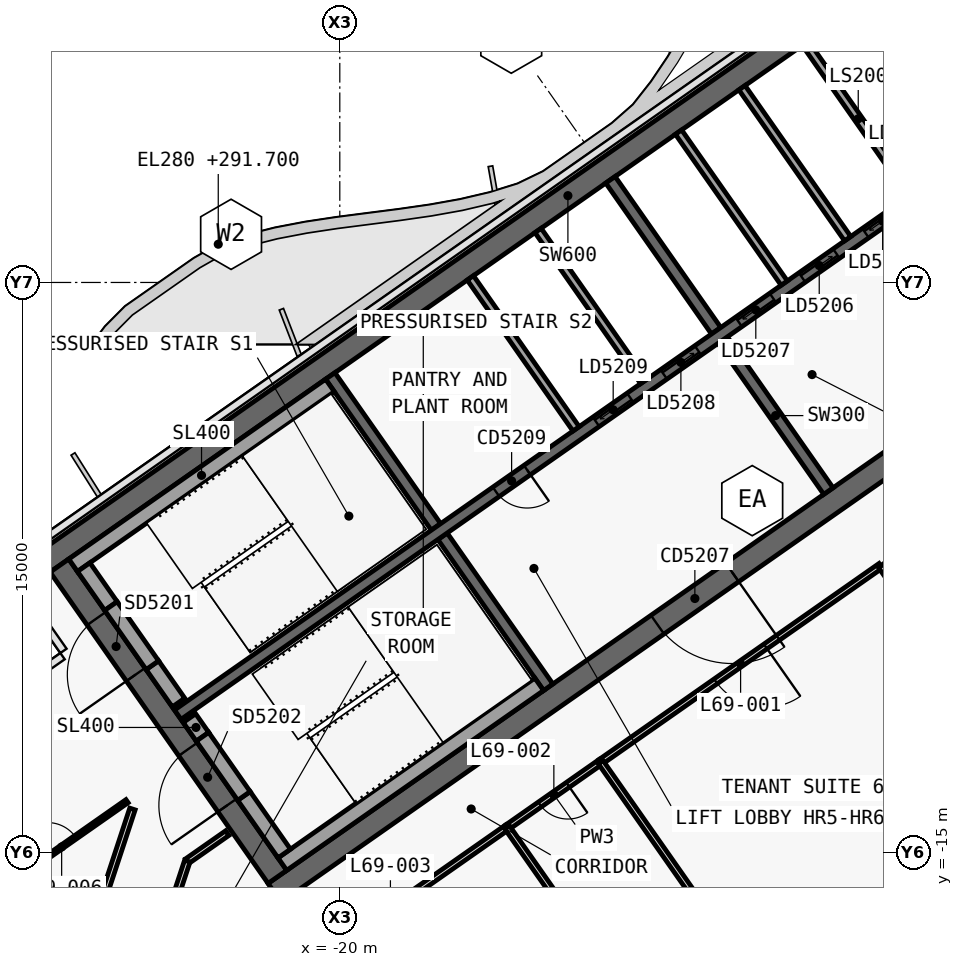
"""IFC4 building model, lengths in metres.
Left out: names, types, materials, properties, quantities, classifications, styles, units other than length and angle.
Written with IfcOpenShell. Run it as: python <this file> out.ifc"""

import sys

from ifc_helpers import new_model, si_unit, direction, frame, frame_2d, origin, place, context, subcontext, project, spatial, polyline, rectangle, outline, extrude, element, fill, save


model = new_model("IFC4")
c1 = context("Model", 3, precision=1e-05, world=origin(), true_north=direction((0.0, 1.0)))
c2 = subcontext(c1, "Body", "Model", "MODEL_VIEW")
j1 = project(units=[si_unit("LENGTHUNIT", "METRE"), si_unit("PLANEANGLEUNIT", "RADIAN")], contexts=[c1])
p1 = place(None, origin())
s1 = spatial("IfcSite", under=j1, at=p1, CompositionType="ELEMENT")
p2 = place(p1, origin())
s2 = spatial("IfcBuilding", under=s1, at=p2, CompositionType="ELEMENT")
p3 = place(p2, frame((0.0, 0.0, 291.7)))
s3 = spatial("IfcBuildingStorey", under=s2, at=p3, CompositionType="ELEMENT", Elevation=291.7)
p4 = place(p3, frame((-0.028, 12.066, 0.0), z_axis=(0.0, 0.0, 1.0), x_axis=(-0.819151382952, -0.573577380837, 0.0)))
e1 = element("IfcWall", 1, at=p4, inside=s3, PredefinedType="SHEAR", context=c2, shape_type="SweptSolid", body=[
    extrude(outline(polyline([(33.898, 0.3), (0.42, 0.3), (0.0, -0.3), (33.898, -0.3), (33.898, 0.3)])), origin(), (0.0, 0.0, 1.0), 3.9),
])
p5 = place(p3, frame((-0.028, -0.874, 0.0), z_axis=(0.0, 0.0, 1.0), x_axis=(-0.819150035022, -0.573579305871, 0.0)))
e2 = element("IfcWall", 2, at=p5, inside=s3, PredefinedType="SHEAR", context=c2, shape_type="SweptSolid", body=[
    extrude(outline(polyline([(26.476, 0.3), (0.42, 0.3), (0.0, -0.3), (26.476, -0.3), (26.476, 0.3)])), origin(), (0.0, 0.0, 1.0), 3.9),
])
p6 = place(p5, frame((2.976, 0.0, 0.0)))
e3 = element("IfcOpeningElement", 3, at=p6, cuts=e2, PredefinedType="OPENING", context=c2, shape_type="SweptSolid", body=[
    extrude(rectangle(XDim=2.4, YDim=2.1, at=frame_2d((1.2, 1.05))), frame((0.0, 0.31, 0.0), z_axis=(0.0, -1.0, 0.0), x_axis=(1.0, 0.0, 0.0)), (0.0, 0.0, 1.0), 0.62),
])
p7 = place(p5, frame((11.776, 0.0, 0.0)))
e4 = element("IfcOpeningElement", 4, at=p7, cuts=e2, PredefinedType="OPENING", context=c2, shape_type="SweptSolid", body=[
    extrude(rectangle(XDim=2.4, YDim=2.1, at=frame_2d((1.2, 1.05))), frame((0.0, 0.31, 0.0), z_axis=(0.0, -1.0, 0.0), x_axis=(1.0, 0.0, 0.0)), (0.0, 0.0, 1.0), 0.62),
])
p8 = place(p3, frame((-21.642, -15.642, 0.0), z_axis=(0.0, 0.0, 1.0), x_axis=(-0.573586866468, 0.819144740944, 0.0)))
e5 = element("IfcWall", 5, at=p8, inside=s3, PredefinedType="SHEAR", context=c2, shape_type="SweptSolid", body=[
    extrude(outline(polyline([(0.0, 0.3), (0.0, -0.3), (10.0, -0.3), (10.0, 0.3), (0.0, 0.3)])), origin(), (0.0, 0.0, 1.0), 3.9),
])
p9 = place(p8, frame((6.5, 0.0, 0.0)))
e6 = element("IfcOpeningElement", 6, at=p9, cuts=e5, PredefinedType="OPENING", context=c2, shape_type="SweptSolid", body=[
    extrude(rectangle(XDim=1.8, YDim=2.1, at=frame_2d((0.9, 1.05))), frame((0.0, 0.31, 0.0), z_axis=(0.0, -1.0, 0.0), x_axis=(1.0, 0.0, 0.0)), (0.0, 0.0, 1.0), 0.62),
])
p10 = place(p8, frame((2.3, 0.0, 0.0)))
e7 = element("IfcOpeningElement", 7, at=p10, cuts=e5, PredefinedType="OPENING", context=c2, shape_type="SweptSolid", body=[
    extrude(rectangle(XDim=1.8, YDim=2.1, at=frame_2d((0.9, 1.05))), frame((0.0, 0.31, 0.0), z_axis=(0.0, -1.0, 0.0), x_axis=(1.0, 0.0, 0.0)), (0.0, 0.0, 1.0), 0.62),
])
p11 = place(p3, frame((-7.143, -5.49, 0.0), z_axis=(0.0, 0.0, 1.0), x_axis=(-0.573617744349, 0.819123118565, 0.0)))
e8 = element("IfcWall", 8, at=p11, inside=s3, PredefinedType="SHEAR", context=c2, shape_type="SweptSolid", body=[
    extrude(outline(polyline([(4.85, 0.15), (0.0, 0.15), (0.0, -0.15), (4.85, -0.15), (4.85, 0.15)])), origin(), (0.0, 0.0, 1.0), 3.9),
])
p12 = place(p3, frame((-10.097, -1.271, 0.0), z_axis=(0.0, 0.0, 1.0), x_axis=(-0.573560315113, 0.819163332265, 0.0)))
e9 = element("IfcWall", 9, at=p12, inside=s3, PredefinedType="SHEAR", context=c2, shape_type="SweptSolid", body=[
    extrude(outline(polyline([(4.85, -0.15), (4.85, 0.15), (0.0, 0.15), (0.0, -0.15), (4.85, -0.15)])), origin(), (0.0, 0.0, 1.0), 3.9),
])
p13 = place(p3, frame((-14.515, -10.652, 0.0), z_axis=(0.0, 0.0, 1.0), x_axis=(-0.573560315113, 0.819163332265, 0.0)))
e10 = element("IfcWall", 10, at=p13, inside=s3, PredefinedType="SHEAR", context=c2, shape_type="SweptSolid", body=[
    extrude(outline(polyline([(4.85, 0.15), (0.0, 0.15), (0.0, -0.15), (4.85, -0.15), (4.85, 0.15)])), origin(), (0.0, 0.0, 1.0), 3.9),
])
p14 = place(p3, frame((-17.469, -6.433, 0.0), z_axis=(0.0, 0.0, 1.0), x_axis=(-0.573594092424, 0.81913968109, 0.0)))
e11 = element("IfcWall", 11, at=p14, inside=s3, PredefinedType="SHEAR", context=c2, shape_type="SweptSolid", body=[
    extrude(outline(polyline([(4.85, -0.15), (4.85, 0.15), (0.0, 0.15), (0.0, -0.15), (4.85, -0.15)])), origin(), (0.0, 0.0, 1.0), 3.9),
])
p15 = place(p3, frame((-2.638, 3.768, 0.0), z_axis=(0.0, 0.0, 1.0), x_axis=(-0.819155014212, -0.573572194837, 0.0)))
e12 = element("IfcWall", 12, at=p15, inside=s3, PredefinedType="SHEAR", context=c2, shape_type="SweptSolid", body=[
    extrude(outline(polyline([(26.4, 0.15), (0.0, 0.15), (0.0, -0.15), (26.4, -0.15), (26.4, 0.15)])), origin(), (0.0, 0.0, 1.0), 3.9),
])
p16 = place(p15, frame((1.169, 0.0, 0.0)))
e13 = element("IfcOpeningElement", 13, at=p16, cuts=e12, PredefinedType="OPENING", context=c2, shape_type="SweptSolid", body=[
    extrude(rectangle(XDim=1.1, YDim=2.1, at=frame_2d((0.55, 1.05))), frame((0.0, 0.16, 0.0), z_axis=(0.0, -1.0, 0.0), x_axis=(1.0, 0.0, 0.0)), (0.0, 0.0, 1.0), 0.32),
])
p17 = place(p15, frame((3.206, 0.0, 0.0)))
e14 = element("IfcOpeningElement", 14, at=p17, cuts=e12, PredefinedType="OPENING", context=c2, shape_type="SweptSolid", body=[
    extrude(rectangle(XDim=1.1, YDim=2.1, at=frame_2d((0.55, 1.05))), frame((0.0, 0.16, 0.0), z_axis=(0.0, -1.0, 0.0), x_axis=(1.0, 0.0, 0.0)), (0.0, 0.0, 1.0), 0.32),
])
p18 = place(p15, frame((5.244, 0.0, 0.0)))
e15 = element("IfcOpeningElement", 15, at=p18, cuts=e12, PredefinedType="OPENING", context=c2, shape_type="SweptSolid", body=[
    extrude(rectangle(XDim=1.1, YDim=2.1, at=frame_2d((0.55, 1.05))), frame((0.0, 0.16, 0.0), z_axis=(0.0, -1.0, 0.0), x_axis=(1.0, 0.0, 0.0)), (0.0, 0.0, 1.0), 0.32),
])
p19 = place(p15, frame((7.281, 0.0, 0.0)))
e16 = element("IfcOpeningElement", 16, at=p19, cuts=e12, PredefinedType="OPENING", context=c2, shape_type="SweptSolid", body=[
    extrude(rectangle(XDim=1.1, YDim=2.1, at=frame_2d((0.55, 1.05))), frame((0.0, 0.16, 0.0), z_axis=(0.0, -1.0, 0.0), x_axis=(1.0, 0.0, 0.0)), (0.0, 0.0, 1.0), 0.32),
])
p20 = place(p15, frame((9.688, 0.0, 0.0)))
e17 = element("IfcOpeningElement", 17, at=p20, cuts=e12, PredefinedType="OPENING", context=c2, shape_type="SweptSolid", body=[
    extrude(rectangle(XDim=1.1, YDim=2.1, at=frame_2d((0.55, 1.05))), frame((0.0, 0.16, 0.0), z_axis=(0.0, -1.0, 0.0), x_axis=(1.0, 0.0, 0.0)), (0.0, 0.0, 1.0), 0.32),
])
p21 = place(p15, frame((11.863, 0.0, 0.0)))
e18 = element("IfcOpeningElement", 18, at=p21, cuts=e12, PredefinedType="OPENING", context=c2, shape_type="SweptSolid", body=[
    extrude(rectangle(XDim=1.1, YDim=2.1, at=frame_2d((0.55, 1.05))), frame((0.0, 0.16, 0.0), z_axis=(0.0, -1.0, 0.0), x_axis=(1.0, 0.0, 0.0)), (0.0, 0.0, 1.0), 0.32),
])
p22 = place(p15, frame((15.175, 0.0, 0.0)))
e19 = element("IfcOpeningElement", 19, at=p22, cuts=e12, PredefinedType="OPENING", context=c2, shape_type="SweptSolid", body=[
    extrude(rectangle(XDim=1.0, YDim=2.1, at=frame_2d((0.5, 1.05))), frame((0.0, 0.16, 0.0), z_axis=(0.0, -1.0, 0.0), x_axis=(1.0, 0.0, 0.0)), (0.0, 0.0, 1.0), 0.32),
])
p23 = place(p3, frame((-4.967, 2.321, 0.0), z_axis=(0.0, 0.0, 1.0), x_axis=(-0.573594092424, 0.81913968109, 0.0)))
e20 = element("IfcWall", 20, at=p23, inside=s3, PredefinedType="SOLIDWALL", context=c2, shape_type="SweptSolid", body=[
    extrude(rectangle(XDim=4.85, YDim=0.2, at=frame_2d((2.425, 0.0))), origin(), (0.0, 0.0, 1.0), 3.9),
])
p24 = place(p3, frame((-6.636, 1.152, 0.0), z_axis=(0.0, 0.0, 1.0), x_axis=(-0.573560315113, 0.819163332265, 0.0)))
e21 = element("IfcWall", 21, at=p24, inside=s3, PredefinedType="SOLIDWALL", context=c2, shape_type="SweptSolid", body=[
    extrude(rectangle(XDim=4.85, YDim=0.2, at=frame_2d((2.425, 0.0))), origin(), (0.0, 0.0, 1.0), 3.9),
])
p25 = place(p3, frame((-8.305, -0.017, 0.0), z_axis=(0.0, 0.0, 1.0), x_axis=(-0.573594092424, 0.81913968109, 0.0)))
e22 = element("IfcWall", 22, at=p25, inside=s3, PredefinedType="SOLIDWALL", context=c2, shape_type="SweptSolid", body=[
    extrude(rectangle(XDim=4.85, YDim=0.2, at=frame_2d((2.425, 0.0))), origin(), (0.0, 0.0, 1.0), 3.9),
])
p26 = place(p3, frame((-12.001, -2.605, 0.0), z_axis=(0.0, 0.0, 1.0), x_axis=(-0.573560315113, 0.819163332265, 0.0)))
e23 = element("IfcWall", 23, at=p26, inside=s3, PredefinedType="SOLIDWALL", context=c2, shape_type="SweptSolid", body=[
    extrude(rectangle(XDim=4.85, YDim=0.2, at=frame_2d((2.425, 0.0))), origin(), (0.0, 0.0, 1.0), 3.9),
])
p27 = place(p3, frame((-13.783, -3.852, 0.0), z_axis=(0.0, 0.0, 1.0), x_axis=(-0.573594092424, 0.81913968109, 0.0)))
e24 = element("IfcWall", 24, at=p27, inside=s3, PredefinedType="SOLIDWALL", context=c2, shape_type="SweptSolid", body=[
    extrude(rectangle(XDim=4.85, YDim=0.2, at=frame_2d((2.425, 0.0))), origin(), (0.0, 0.0, 1.0), 3.9),
])
p28 = place(p3, frame((-20.259, -2.71, 0.0), z_axis=(0.0, 0.0, 1.0), x_axis=(-0.81914849389, -0.573581506813, 0.0)))
e25 = element("IfcWall", 25, at=p28, inside=s3, PredefinedType="SOLIDWALL", context=c2, shape_type="SweptSolid", body=[
    extrude(rectangle(XDim=8.25, YDim=0.4, at=frame_2d((4.125, 0.0))), origin(), (0.0, 0.0, 1.0), 3.62),
])
p29 = place(p3, frame((-24.244, -11.055, 0.0), z_axis=(0.0, 0.0, 1.0), x_axis=(-0.573571582932, 0.819155442668, 0.0)))
e26 = element("IfcWall", 26, at=p29, inside=s3, PredefinedType="SOLIDWALL", context=c2, shape_type="SweptSolid", body=[
    extrude(rectangle(XDim=1.2, YDim=0.4, at=frame_2d((0.6, 0.0))), origin(), (0.0, 0.0, 1.0), 3.62),
])
p30 = place(p3, frame((-26.022, -8.515, 0.0), z_axis=(0.0, 0.0, 1.0), x_axis=(-0.573619628835, 0.819121798889, 0.0)))
e27 = element("IfcWall", 27, at=p30, inside=s3, PredefinedType="SOLIDWALL", context=c2, shape_type="SweptSolid", body=[
    extrude(rectangle(XDim=1.25, YDim=0.4, at=frame_2d((0.625, 0.0))), origin(), (0.0, 0.0, 1.0), 3.62),
])
p31 = place(p3, frame((-24.932, -10.072, 2.15), z_axis=(0.0, 0.0, 1.0), x_axis=(-0.573591692345, 0.819141361715, 0.0)))
e28 = element("IfcWall", 28, at=p31, inside=s3, PredefinedType="SOLIDWALL", context=c2, shape_type="SweptSolid", body=[
    extrude(rectangle(XDim=1.9, YDim=0.4, at=frame_2d((0.95, 0.0))), origin(), (0.0, 0.0, 1.0), 1.47),
])
p32 = place(p3, frame((-14.753, -10.574, 0.0), z_axis=(0.0, 0.0, 1.0), x_axis=(-0.819158229677, -0.573567602601, 0.0)))
e29 = element("IfcWall", 29, at=p32, inside=s3, PredefinedType="SOLIDWALL", context=c2, shape_type="SweptSolid", body=[
    extrude(rectangle(XDim=8.25, YDim=0.4, at=frame_2d((4.125, 0.0))), origin(), (0.0, 0.0, 1.0), 3.62),
])
p33 = place(p3, frame((-21.462, -15.028, 0.0), z_axis=(0.0, 0.0, 1.0), x_axis=(-0.573559770908, 0.819163713305, 0.0)))
e30 = element("IfcWall", 30, at=p33, inside=s3, PredefinedType="SOLIDWALL", context=c2, shape_type="SweptSolid", body=[
    extrude(rectangle(XDim=1.85, YDim=0.4, at=frame_2d((0.925, 0.0))), origin(), (0.0, 0.0, 1.0), 3.62),
])
p34 = place(p3, frame((-23.613, -11.956, 0.0), z_axis=(0.0, 0.0, 1.0), x_axis=(-0.573435029941, 0.819251039936, 0.0)))
e31 = element("IfcWall", 31, at=p34, inside=s3, PredefinedType="SOLIDWALL", context=c2, shape_type="SweptSolid", body=[
    extrude(rectangle(XDim=0.6, YDim=0.4, at=frame_2d((0.3, 0.0))), origin(), (0.0, 0.0, 1.0), 3.62),
])
p35 = place(p3, frame((-22.523, -13.512, 2.15), z_axis=(0.0, 0.0, 1.0), x_axis=(-0.573591692345, 0.819141361715, 0.0)))
e32 = element("IfcWall", 32, at=p35, inside=s3, PredefinedType="SOLIDWALL", context=c2, shape_type="SweptSolid", body=[
    extrude(rectangle(XDim=1.9, YDim=0.4, at=frame_2d((0.95, 0.0))), origin(), (0.0, 0.0, 1.0), 1.47),
])
p36 = place(p3, frame((-3.298, 3.49, 0.0), z_axis=(0.0, 0.0, 1.0), x_axis=(-0.573560315113, 0.819163332265, 0.0)))
e33 = element("IfcWall", 33, at=p36, inside=s3, PredefinedType="SOLIDWALL", context=c2, shape_type="SweptSolid", body=[
    extrude(rectangle(XDim=4.85, YDim=0.2, at=frame_2d((2.425, 0.0))), origin(), (0.0, 0.0, 1.0), 3.62),
])
p37 = place(p3, frame((-5.766, -7.456, 0.0), z_axis=(0.0, 0.0, 1.0), x_axis=(-0.81915291695, -0.57357519006, 0.0)))
e34 = element("IfcWall", 34, at=p37, inside=s3, PredefinedType="PARTITIONING", context=c2, shape_type="SweptSolid", body=[
    extrude(rectangle(XDim=9.002, YDim=0.15, at=frame_2d((4.501, 0.0))), origin(), (0.0, 0.0, 1.0), 3.05),
])
p38 = place(p37, frame((3.701, 0.0, 0.0)))
e35 = element("IfcOpeningElement", 35, at=p38, cuts=e34, PredefinedType="OPENING", context=c2, shape_type="SweptSolid", body=[
    extrude(rectangle(XDim=1.6, YDim=2.1, at=frame_2d((0.8, 1.05))), frame((0.0, 0.085, 0.0), z_axis=(0.0, -1.0, 0.0), x_axis=(1.0, 0.0, 0.0)), (0.0, 0.0, 1.0), 0.17),
])
p39 = place(p3, frame((-13.137, -12.617, 0.0), z_axis=(0.0, 0.0, 1.0), x_axis=(-0.81916700466, -0.573555070134, 0.0)))
e36 = element("IfcWall", 36, at=p39, inside=s3, PredefinedType="PARTITIONING", context=c2, shape_type="SweptSolid", body=[
    extrude(rectangle(XDim=3.004, YDim=0.15, at=frame_2d((1.502, 0.0))), origin(), (0.0, 0.0, 1.0), 3.05),
])
p40 = place(p39, frame((1.052, 0.0, 0.0)))
e37 = element("IfcOpeningElement", 37, at=p40, cuts=e36, PredefinedType="OPENING", context=c2, shape_type="SweptSolid", body=[
    extrude(rectangle(XDim=0.9, YDim=2.1, at=frame_2d((0.45, 1.05))), frame((0.0, 0.085, 0.0), z_axis=(0.0, -1.0, 0.0), x_axis=(1.0, 0.0, 0.0)), (0.0, 0.0, 1.0), 0.17),
])
p41 = place(p3, frame((-15.594, -14.338, 0.0), z_axis=(0.0, 0.0, 1.0), x_axis=(-0.819164661457, -0.573558416746, 0.0)))
e38 = element("IfcWall", 38, at=p41, inside=s3, PredefinedType="PARTITIONING", context=c2, shape_type="SweptSolid", body=[
    extrude(rectangle(XDim=7.504, YDim=0.15, at=frame_2d((3.752, 0.0))), origin(), (0.0, 0.0, 1.0), 3.05),
])
p42 = place(p41, frame((2.952, 0.0, 0.0)))
e39 = element("IfcOpeningElement", 39, at=p42, cuts=e38, PredefinedType="OPENING", context=c2, shape_type="SweptSolid", body=[
    extrude(rectangle(XDim=1.6, YDim=2.1, at=frame_2d((0.8, 1.05))), frame((0.0, 0.085, 0.0), z_axis=(0.0, -1.0, 0.0), x_axis=(1.0, 0.0, 0.0)), (0.0, 0.0, 1.0), 0.17),
])
p43 = place(p3, frame((-1.849, -13.051, 0.0), z_axis=(0.0, 0.0, 1.0), x_axis=(-0.57357985571, 0.819149650018, 0.0)))
e40 = element("IfcWall", 40, at=p43, inside=s3, PredefinedType="PARTITIONING", context=c2, shape_type="SweptSolid", body=[
    extrude(rectangle(XDim=6.832, YDim=0.15, at=frame_2d((3.416, 0.0))), origin(), (0.0, 0.0, 1.0), 3.05),
])
p44 = place(p3, frame((-27.097, -18.838, 0.0), z_axis=(0.0, 0.0, 1.0), x_axis=(0.312790582107, 0.949822115843, 0.0)))
e41 = element("IfcWall", 41, at=p44, inside=s3, PredefinedType="PARTITIONING", context=c2, shape_type="SweptSolid", body=[
    extrude(rectangle(XDim=5.245, YDim=0.15, at=frame_2d((2.623, 0.0))), origin(), (0.0, 0.0, 1.0), 3.05),
])
p45 = place(p3, frame((-22.961, -14.49, 0.0), z_axis=(0.0, 0.0, 1.0), x_axis=(-0.819133624144, -0.573602742145, 0.0)))
e42 = element("IfcWall", 42, at=p45, inside=s3, PredefinedType="PARTITIONING", context=c2, shape_type="SweptSolid", body=[
    extrude(rectangle(XDim=1.284, YDim=0.15, at=frame_2d((0.642, 0.0))), origin(), (0.0, 0.0, 1.0), 3.62),
])
p46 = place(p3, frame((-24.013, -15.227, 0.0), z_axis=(0.0, 0.0, 1.0), x_axis=(-0.312793296718, -0.949821221877, 0.0)))
e43 = element("IfcWall", 43, at=p46, inside=s3, PredefinedType="PARTITIONING", context=c2, shape_type="SweptSolid", body=[
    extrude(rectangle(XDim=3.841, YDim=0.15, at=frame_2d((1.92, 0.0))), origin(), (0.0, 0.0, 1.0), 3.05),
])
p47 = place(p46, frame((1.47, 0.0, 0.0)))
e44 = element("IfcOpeningElement", 44, at=p47, cuts=e43, PredefinedType="OPENING", context=c2, shape_type="SweptSolid", body=[
    extrude(rectangle(XDim=0.9, YDim=2.1, at=frame_2d((0.45, 1.05))), frame((0.0, 0.085, 0.0), z_axis=(0.0, -1.0, 0.0), x_axis=(1.0, 0.0, 0.0)), (0.0, 0.0, 1.0), 0.17),
])
p48 = place(p3, frame((-29.04, -16.06, 0.0), z_axis=(0.0, 0.0, 1.0), x_axis=(0.819139100631, 0.573594921367, 0.0)))
e45 = element("IfcWall", 45, at=p48, inside=s3, PredefinedType="PARTITIONING", context=c2, shape_type="SweptSolid", body=[
    extrude(rectangle(XDim=4.202, YDim=0.1, at=frame_2d((2.101, 0.0))), origin(), (0.0, 0.0, 1.0), 3.05),
])
p49 = place(p48, frame((1.651, 0.0, 0.0)))
e46 = element("IfcOpeningElement", 46, at=p49, cuts=e45, PredefinedType="OPENING", context=c2, shape_type="SweptSolid", body=[
    extrude(rectangle(XDim=0.9, YDim=2.1, at=frame_2d((0.45, 1.05))), frame((0.0, 0.06, 0.0), z_axis=(0.0, -1.0, 0.0), x_axis=(1.0, 0.0, 0.0)), (0.0, 0.0, 1.0), 0.12),
])
p50 = place(p3, frame((-9.221, -18.213, 0.0), z_axis=(0.0, 0.0, 1.0), x_axis=(-0.573560698343, 0.819163063936, 0.0)))
e47 = element("IfcWall", 47, at=p50, inside=s3, PredefinedType="PARTITIONING", context=c2, shape_type="SweptSolid", body=[
    extrude(rectangle(XDim=6.83, YDim=0.15, at=frame_2d((3.415, 0.0))), origin(), (0.0, 0.0, 1.0), 3.05),
])
p51 = place(p3, frame((-13.587, -17.208, 0.0), z_axis=(0.0, 0.0, 1.0), x_axis=(-0.573569944718, 0.819156589741, 0.0)))
e48 = element("IfcWall", 48, at=p51, inside=s3, PredefinedType="PARTITIONING", context=c2, shape_type="SweptSolid", body=[
    extrude(rectangle(XDim=3.502, YDim=0.15, at=frame_2d((1.751, 0.0))), origin(), (0.0, 0.0, 1.0), 3.62),
])
p52 = place(p17, origin())
e49 = element("IfcDoor", 49, at=p52, inside=s3, OperationType="SLIDING_TO_RIGHT", PredefinedType="DOOR", context=c2, shape_type="SweptSolid", body=[
    extrude(rectangle(XDim=1.1, YDim=2.1, at=frame_2d((0.55, 1.05))), frame((0.0, 0.025, 0.0), z_axis=(0.0, -1.0, 0.0), x_axis=(1.0, 0.0, 0.0)), (0.0, 0.0, 1.0), 0.05),
])
fill(e14, e49)
p53 = place(p18, origin())
e50 = element("IfcDoor", 50, at=p53, inside=s3, OperationType="SLIDING_TO_LEFT", PredefinedType="DOOR", context=c2, shape_type="SweptSolid", body=[
    extrude(rectangle(XDim=1.1, YDim=2.1, at=frame_2d((0.55, 1.05))), frame((0.0, 0.025, 0.0), z_axis=(0.0, -1.0, 0.0), x_axis=(1.0, 0.0, 0.0)), (0.0, 0.0, 1.0), 0.05),
])
fill(e15, e50)
p54 = place(p19, origin())
e51 = element("IfcDoor", 51, at=p54, inside=s3, OperationType="SLIDING_TO_RIGHT", PredefinedType="DOOR", context=c2, shape_type="SweptSolid", body=[
    extrude(rectangle(XDim=1.1, YDim=2.1, at=frame_2d((0.55, 1.05))), frame((0.0, 0.025, 0.0), z_axis=(0.0, -1.0, 0.0), x_axis=(1.0, 0.0, 0.0)), (0.0, 0.0, 1.0), 0.05),
])
fill(e16, e51)
p55 = place(p20, origin())
e52 = element("IfcDoor", 52, at=p55, inside=s3, OperationType="SLIDING_TO_LEFT", PredefinedType="DOOR", context=c2, shape_type="SweptSolid", body=[
    extrude(rectangle(XDim=1.1, YDim=2.1, at=frame_2d((0.55, 1.05))), frame((0.0, 0.025, 0.0), z_axis=(0.0, -1.0, 0.0), x_axis=(1.0, 0.0, 0.0)), (0.0, 0.0, 1.0), 0.05),
])
fill(e17, e52)
p56 = place(p21, origin())
e53 = element("IfcDoor", 53, at=p56, inside=s3, OperationType="SLIDING_TO_RIGHT", PredefinedType="DOOR", context=c2, shape_type="SweptSolid", body=[
    extrude(rectangle(XDim=1.1, YDim=2.1, at=frame_2d((0.55, 1.05))), frame((0.0, 0.025, 0.0), z_axis=(0.0, -1.0, 0.0), x_axis=(1.0, 0.0, 0.0)), (0.0, 0.0, 1.0), 0.05),
])
fill(e18, e53)
p57 = place(p22, origin())
e54 = element("IfcDoor", 54, at=p57, inside=s3, OperationType="SINGLE_SWING_RIGHT", PredefinedType="DOOR", context=c2, shape_type="SweptSolid", body=[
    extrude(rectangle(XDim=1.0, YDim=2.1, at=frame_2d((0.5, 1.05))), frame((0.0, 0.025, 0.0), z_axis=(0.0, -1.0, 0.0), x_axis=(1.0, 0.0, 0.0)), (0.0, 0.0, 1.0), 0.05),
])
fill(e19, e54)
p58 = place(p7, origin())
e55 = element("IfcDoor", 55, at=p58, inside=s3, OperationType="DOUBLE_DOOR_SINGLE_SWING", PredefinedType="DOOR", context=c2, shape_type="SweptSolid", body=[
    extrude(rectangle(XDim=2.4, YDim=2.1, at=frame_2d((1.2, 1.05))), frame((0.0, 0.025, 0.0), z_axis=(0.0, -1.0, 0.0), x_axis=(1.0, 0.0, 0.0)), (0.0, 0.0, 1.0), 0.05),
])
fill(e4, e55)
p59 = place(p9, origin())
e56 = element("IfcDoor", 56, at=p59, inside=s3, OperationType="DOUBLE_DOOR_SINGLE_SWING", PredefinedType="DOOR", context=c2, shape_type="SweptSolid", body=[
    extrude(rectangle(XDim=1.8, YDim=2.1, at=frame_2d((0.9, 1.05))), frame((0.0, 0.025, 0.0), z_axis=(0.0, -1.0, 0.0), x_axis=(1.0, 0.0, 0.0)), (0.0, 0.0, 1.0), 0.05),
])
fill(e6, e56)
p60 = place(p10, origin())
e57 = element("IfcDoor", 57, at=p60, inside=s3, OperationType="DOUBLE_DOOR_SINGLE_SWING", PredefinedType="DOOR", context=c2, shape_type="SweptSolid", body=[
    extrude(rectangle(XDim=1.8, YDim=2.1, at=frame_2d((0.9, 1.05))), frame((0.0, 0.025, 0.0), z_axis=(0.0, -1.0, 0.0), x_axis=(1.0, 0.0, 0.0)), (0.0, 0.0, 1.0), 0.05),
])
fill(e7, e57)
p61 = place(p38, origin())
e58 = element("IfcDoor", 58, at=p61, inside=s3, OperationType="DOUBLE_DOOR_SINGLE_SWING", PredefinedType="DOOR", context=c2, shape_type="SweptSolid", body=[
    extrude(rectangle(XDim=1.6, YDim=2.1, at=frame_2d((0.8, 1.05))), frame((0.0, 0.025, 0.0), z_axis=(0.0, -1.0, 0.0), x_axis=(1.0, 0.0, 0.0)), (0.0, 0.0, 1.0), 0.05),
])
fill(e35, e58)
p62 = place(p40, origin())
e59 = element("IfcDoor", 59, at=p62, inside=s3, OperationType="SINGLE_SWING_LEFT", PredefinedType="DOOR", context=c2, shape_type="SweptSolid", body=[
    extrude(rectangle(XDim=0.9, YDim=2.1, at=frame_2d((0.45, 1.05))), frame((0.0, 0.025, 0.0), z_axis=(0.0, -1.0, 0.0), x_axis=(1.0, 0.0, 0.0)), (0.0, 0.0, 1.0), 0.05),
])
fill(e37, e59)
p63 = place(p49, origin())
e60 = element("IfcDoor", 60, at=p63, inside=s3, OperationType="SINGLE_SWING_LEFT", PredefinedType="DOOR", context=c2, shape_type="SweptSolid", body=[
    extrude(rectangle(XDim=0.9, YDim=2.1, at=frame_2d((0.45, 1.05))), frame((0.0, 0.025, 0.0), z_axis=(0.0, -1.0, 0.0), x_axis=(1.0, 0.0, 0.0)), (0.0, 0.0, 1.0), 0.05),
])
fill(e46, e60)
save(model, sys.argv[1])
